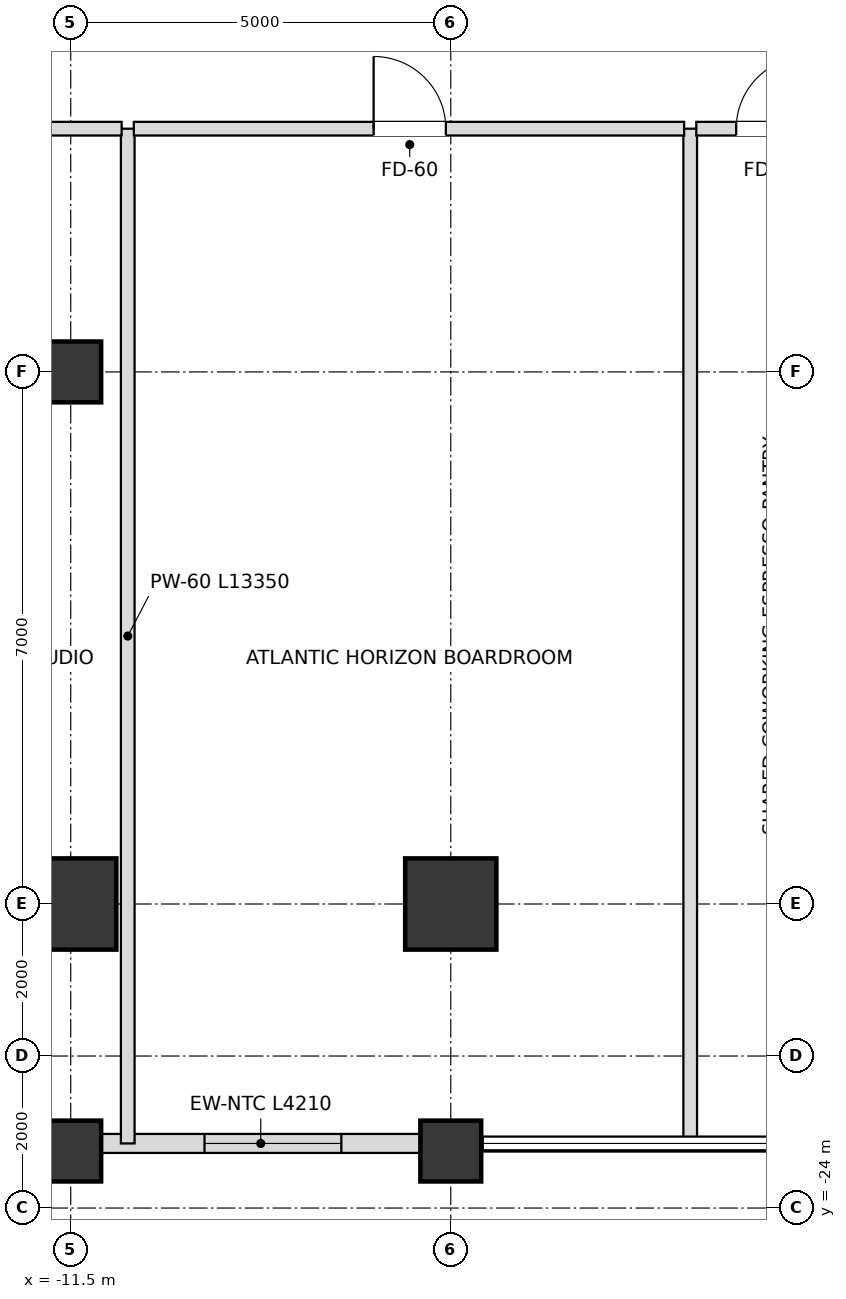
"""IFC4 building model, lengths in metres.
Left out: names, types, materials, properties, quantities, classifications, styles, units other than length and angle.
Written with IfcOpenShell. Run it as: python <this file> out.ifc"""

import sys

from ifc_helpers import new_model, si_unit, direction, frame, frame_2d, origin, origin_2d, place, context, subcontext, project, spatial, rectangle, extrude, element, fill, save


model = new_model("IFC4")
c1 = context("Model", 3, precision=1e-05, world=origin(), true_north=direction((0.0, 1.0)))
c2 = subcontext(c1, "Body", "Model", "MODEL_VIEW")
j1 = project(units=[si_unit("LENGTHUNIT", "METRE"), si_unit("PLANEANGLEUNIT", "RADIAN")], contexts=[c1])
p1 = place(None, origin())
s1 = spatial("IfcSite", under=j1, at=p1, CompositionType="ELEMENT")
p2 = place(p1, origin())
s2 = spatial("IfcBuilding", under=s1, at=p2, CompositionType="ELEMENT")
p3 = place(p2, frame((0.0, 0.0, 158.4)))
s3 = spatial("IfcBuildingStorey", under=s2, at=p3, CompositionType="ELEMENT", Elevation=158.4)
for number, where, z_axis, x_axis in (
    (1, (-11.5, -20.0, 0.0), (0.0, 0.0, 1.0), (1.0, 0.0, 0.0)),
    (2, (-6.5, -20.0, 0.0), (0.0, 0.0, 1.0), (1.0, 0.0, 0.0)),
):
    element("IfcColumn", number, at=place(p3, frame(where, z_axis=z_axis, x_axis=x_axis)), inside=s3, PredefinedType="USERDEFINED", context=c2, shape_type="SweptSolid", body=[
        extrude(rectangle(XDim=1.2, YDim=1.2, at=origin_2d()), origin(), (0.0, 0.0, 1.0), 3.6),
    ])
for number, where, z_axis, x_axis in (
    (3, (-11.5, -13.0, 0.0), (0.0, 0.0, 1.0), (1.0, 0.0, 0.0)),
    (4, (-11.5, -23.25, 0.0), (0.0, 0.0, 1.0), (1.0, 0.0, 0.0)),
    (5, (-6.5, -23.25, 0.0), (0.0, 0.0, 1.0), (1.0, 0.0, 0.0)),
):
    element("IfcColumn", number, at=place(p3, frame(where, z_axis=z_axis, x_axis=x_axis)), inside=s3, PredefinedType="COLUMN", context=c2, shape_type="SweptSolid", body=[
        extrude(rectangle(XDim=0.8, YDim=0.8, at=origin_2d()), origin(), (0.0, 0.0, 1.0), 3.6),
    ])
p4 = place(p3, frame((-11.105, -23.15, 0.0), z_axis=(0.0, 0.0, 1.0), x_axis=(1.0, 0.0, 0.0)))
e6 = element("IfcWall", 6, at=p4, inside=s3, PredefinedType="SOLIDWALL", context=c2, shape_type="SweptSolid", body=[
    extrude(rectangle(XDim=4.21, YDim=0.25, at=frame_2d((2.105, 0.0))), origin(), (0.0, 0.0, 1.0), 2.736),
])
p5 = place(p4, frame((1.365, 0.0, 0.72)))
e7 = element("IfcOpeningElement", 7, at=p5, cuts=e6, PredefinedType="OPENING", context=c2, shape_type="SweptSolid", body=[
    extrude(rectangle(XDim=1.8, YDim=1.68, at=frame_2d((0.9, 0.84))), frame((0.0, 0.135, 0.0), z_axis=(0.0, -1.0, 0.0), x_axis=(1.0, 0.0, 0.0)), (0.0, 0.0, 1.0), 0.27),
])
for number, where, z_axis, x_axis in (
    (8, (-10.75, -23.15, 0.0), (0.0, 0.0, 1.0), (0.0, 1.0, 0.0)),
    (9, (-3.35, -23.15, 0.0), (0.0, 0.0, 1.0), (0.0, 1.0, 0.0)),
):
    element("IfcWall", number, at=place(p3, frame(where, z_axis=z_axis, x_axis=x_axis)), inside=s3, PredefinedType="PARTITIONING", context=c2, shape_type="SweptSolid", body=[
        extrude(rectangle(XDim=13.35, YDim=0.18, at=frame_2d((6.675, 0.0))), origin(), (0.0, 0.0, 1.0), 2.816),
    ])
p6 = place(p3, frame((-15.65, -9.8, 0.0), z_axis=(0.0, 0.0, 1.0), x_axis=(1.0, 0.0, 0.0)))
e10 = element("IfcWall", 10, at=p6, inside=s3, PredefinedType="PARTITIONING", context=c2, shape_type="SweptSolid", body=[
    extrude(rectangle(XDim=4.82, YDim=0.18, at=frame_2d((2.41, 0.0))), origin(), (0.0, 0.0, 1.0), 3.38),
])
p7 = place(p6, frame((1.975, 0.0, 0.0)))
e11 = element("IfcOpeningElement", 11, at=p7, cuts=e10, PredefinedType="OPENING", context=c2, shape_type="SweptSolid", body=[
    extrude(rectangle(XDim=0.95, YDim=2.15, at=frame_2d((0.475, 1.075))), frame((0.0, 0.1, 0.0), z_axis=(0.0, -1.0, 0.0), x_axis=(1.0, 0.0, 0.0)), (0.0, 0.0, 1.0), 0.2),
])
p8 = place(p3, frame((-10.67, -9.8, 0.0), z_axis=(0.0, 0.0, 1.0), x_axis=(1.0, 0.0, 0.0)))
e12 = element("IfcWall", 12, at=p8, inside=s3, PredefinedType="PARTITIONING", context=c2, shape_type="SweptSolid", body=[
    extrude(rectangle(XDim=7.24, YDim=0.18, at=frame_2d((3.62, 0.0))), origin(), (0.0, 0.0, 1.0), 2.816),
])
p9 = place(p8, frame((3.155, 0.0, 0.0)))
e13 = element("IfcOpeningElement", 13, at=p9, cuts=e12, PredefinedType="OPENING", context=c2, shape_type="SweptSolid", body=[
    extrude(rectangle(XDim=0.95, YDim=2.15, at=frame_2d((0.475, 1.075))), frame((0.0, 0.1, 0.0), z_axis=(0.0, -1.0, 0.0), x_axis=(1.0, 0.0, 0.0)), (0.0, 0.0, 1.0), 0.2),
])
p10 = place(p3, frame((-3.27, -9.8, 0.0), z_axis=(0.0, 0.0, 1.0), x_axis=(1.0, 0.0, 0.0)))
e14 = element("IfcWall", 14, at=p10, inside=s3, PredefinedType="PARTITIONING", context=c2, shape_type="SweptSolid", body=[
    extrude(rectangle(XDim=1.99, YDim=0.18, at=frame_2d((0.995, 0.0))), origin(), (0.0, 0.0, 1.0), 3.38),
])
p11 = place(p10, frame((0.525, 0.0, 0.0)))
e15 = element("IfcOpeningElement", 15, at=p11, cuts=e14, PredefinedType="OPENING", context=c2, shape_type="SweptSolid", body=[
    extrude(rectangle(XDim=0.95, YDim=2.15, at=frame_2d((0.475, 1.075))), frame((0.0, 0.1, 0.0), z_axis=(0.0, -1.0, 0.0), x_axis=(1.0, 0.0, 0.0)), (0.0, 0.0, 1.0), 0.2),
])
p12 = place(p5, origin())
e16 = element("IfcWindow", 16, at=p12, inside=s3, PartitioningType="SINGLE_PANEL", PredefinedType="WINDOW", context=c2, shape_type="SweptSolid", body=[
    extrude(rectangle(XDim=1.8, YDim=1.68, at=frame_2d((0.9, 0.84))), frame((0.0, 0.03, 0.0), z_axis=(0.0, -1.0, 0.0), x_axis=(1.0, 0.0, 0.0)), (0.0, 0.0, 1.0), 0.06),
])
fill(e7, e16)
p13 = place(p9, origin())
e17 = element("IfcDoor", 17, at=p13, inside=s3, OperationType="SINGLE_SWING_LEFT", PredefinedType="DOOR", context=c2, shape_type="SweptSolid", body=[
    extrude(rectangle(XDim=0.95, YDim=2.15, at=frame_2d((0.475, 1.075))), frame((0.0, 0.025, 0.0), z_axis=(0.0, -1.0, 0.0), x_axis=(1.0, 0.0, 0.0)), (0.0, 0.0, 1.0), 0.05),
])
fill(e13, e17)
p14 = place(p11, origin())
e18 = element("IfcDoor", 18, at=p14, inside=s3, OperationType="SINGLE_SWING_RIGHT", PredefinedType="DOOR", context=c2, shape_type="SweptSolid", body=[
    extrude(rectangle(XDim=0.95, YDim=2.15, at=frame_2d((0.475, 1.075))), frame((0.0, 0.025, 0.0), z_axis=(0.0, -1.0, 0.0), x_axis=(1.0, 0.0, 0.0)), (0.0, 0.0, 1.0), 0.05),
])
fill(e15, e18)
save(model, sys.argv[1])
